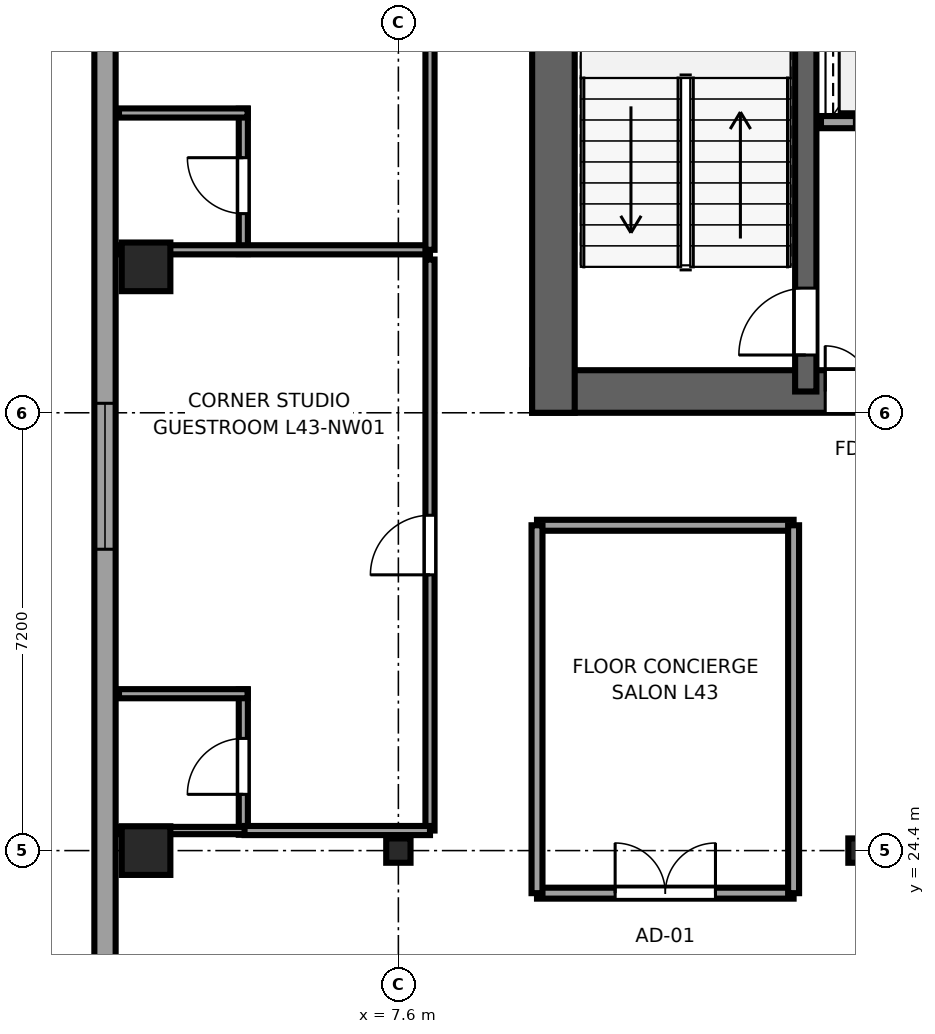
"""IFC4 building model, lengths in metres.
Left out: names, types, materials, properties, quantities, classifications, styles, units other than length and angle.
Written with IfcOpenShell. Run it as: python <this file> out.ifc"""

import sys

from ifc_helpers import new_model, si_unit, direction, frame, frame_2d, origin, origin_2d, place, context, subcontext, project, spatial, rectangle, i_section, extrude, source, transform, mapped, element, fill, save


model = new_model("IFC4")
c1 = context("Model", 3, precision=1e-05, world=origin(), true_north=direction((0.0, 1.0)))
c2 = subcontext(c1, "Body", "Model", "MODEL_VIEW")
j1 = project(units=[si_unit("LENGTHUNIT", "METRE"), si_unit("PLANEANGLEUNIT", "RADIAN")], contexts=[c1])
p1 = place(None, origin())
s1 = spatial("IfcSite", under=j1, at=p1, CompositionType="ELEMENT")
p2 = place(p1, origin())
s2 = spatial("IfcBuilding", under=s1, at=p2, CompositionType="ELEMENT")
p3 = place(p2, frame((0.0, 0.0, 164.8)))
s3 = spatial("IfcBuildingStorey", under=s2, at=p3, CompositionType="ELEMENT", Elevation=164.8)
p4 = place(p3, frame((9.8, 31.95, 0.0), z_axis=(0.0, 0.0, 1.0), x_axis=(1.0, 0.0, 0.0)))
e1 = element("IfcWall", 1, at=p4, inside=s3, PredefinedType="SHEAR", context=c2, shape_type="SweptSolid", body=[
    extrude(rectangle(XDim=26.4, YDim=0.7, at=frame_2d((13.2, 0.0))), origin(), (0.0, 0.0, 1.0), 3.55),
])
p5 = place(p4, frame((6.32, 0.0, 0.0), z_axis=(0.0, 0.0, 1.0), x_axis=(-1.0, 0.0, 0.0)))
e2 = element("IfcOpeningElement", 2, at=p5, cuts=e1, PredefinedType="OPENING", context=c2, shape_type="SweptSolid", body=[
    extrude(rectangle(XDim=1.5, YDim=2.04, at=frame_2d((0.75, 1.02))), frame((0.0, 0.36, 0.0), z_axis=(0.0, -1.0, 0.0), x_axis=(1.0, 0.0, 0.0)), (0.0, 0.0, 1.0), 0.72),
])
p6 = place(p4, frame((13.95, 0.0, 0.0), z_axis=(0.0, 0.0, 1.0), x_axis=(-1.0, 0.0, 0.0)))
e3 = element("IfcOpeningElement", 3, at=p6, cuts=e1, PredefinedType="OPENING", context=c2, shape_type="SweptSolid", body=[
    extrude(rectangle(XDim=1.5, YDim=2.04, at=frame_2d((0.75, 1.02))), frame((0.0, 0.36, 0.0), z_axis=(0.0, -1.0, 0.0), x_axis=(1.0, 0.0, 0.0)), (0.0, 0.0, 1.0), 0.72),
])
p7 = place(p4, frame((20.25, 0.0, 0.0), z_axis=(0.0, 0.0, 1.0), x_axis=(-1.0, 0.0, 0.0)))
e4 = element("IfcOpeningElement", 4, at=p7, cuts=e1, PredefinedType="OPENING", context=c2, shape_type="SweptSolid", body=[
    extrude(rectangle(XDim=1.5, YDim=2.04, at=frame_2d((0.75, 1.02))), frame((0.0, 0.36, 0.0), z_axis=(0.0, -1.0, 0.0), x_axis=(1.0, 0.0, 0.0)), (0.0, 0.0, 1.0), 0.72),
])
p8 = place(p4, frame((8.37, 0.0, 0.0), z_axis=(0.0, 0.0, 1.0), x_axis=(-1.0, 0.0, 0.0)))
e5 = element("IfcOpeningElement", 5, at=p8, cuts=e1, PredefinedType="OPENING", context=c2, shape_type="SweptSolid", body=[
    extrude(rectangle(XDim=0.82, YDim=2.01, at=frame_2d((0.41, 1.005))), frame((0.0, 0.36, 0.0), z_axis=(0.0, -1.0, 0.0), x_axis=(1.0, 0.0, 0.0)), (0.0, 0.0, 1.0), 0.72),
])
p9 = place(p3, frame((10.15, 31.6, 0.0), z_axis=(0.0, 0.0, 1.0), x_axis=(0.0, 1.0, 0.0)))
e6 = element("IfcWall", 6, at=p9, inside=s3, PredefinedType="SHEAR", context=c2, shape_type="SweptSolid", body=[
    extrude(rectangle(XDim=13.6, YDim=0.7, at=frame_2d((6.8, 0.0))), origin(), (0.0, 0.0, 1.0), 3.55),
])
p10 = place(p3, frame((14.3, 31.95, 0.0), z_axis=(0.0, 0.0, 1.0), x_axis=(0.0, 1.0, 0.0)))
e7 = element("IfcWall", 7, at=p10, inside=s3, PredefinedType="SHEAR", context=c2, shape_type="SweptSolid", body=[
    extrude(rectangle(XDim=12.9, YDim=0.35, at=frame_2d((6.45, 0.0))), origin(), (0.0, 0.0, 1.0), 3.55),
])
p11 = place(p10, frame((0.6, 0.0, 0.0)))
e8 = element("IfcOpeningElement", 8, at=p11, cuts=e7, PredefinedType="OPENING", context=c2, shape_type="SweptSolid", body=[
    extrude(rectangle(XDim=1.1, YDim=2.12, at=frame_2d((0.55, 1.06))), frame((0.0, 0.185, 0.0), z_axis=(0.0, -1.0, 0.0), x_axis=(1.0, 0.0, 0.0)), (0.0, 0.0, 1.0), 0.37),
])
m1 = source(origin(), c2, "Body", "SweptSolid", [
    extrude(rectangle(XDim=0.8, YDim=0.8, at=origin_2d()), origin(), (0.0, 0.0, 1.0), 3.55),
])
p12 = place(p3, frame((3.45, 24.4, 0.0), z_axis=(0.0, 0.0, 1.0), x_axis=(1.0, 0.0, 0.0)))
e9 = element("IfcColumn", 9, at=p12, inside=s3, PredefinedType="COLUMN", context=c2, shape_type="MappedRepresentation", body=[
    mapped(m1, transform((0.0, 0.0, 0.0), x_axis=(1.0, 0.0, 0.0), y_axis=(0.0, 1.0, 0.0), z_axis=(0.0, 0.0, 1.0), scale=1.0)),
])
m2 = source(origin(), c2, "Body", "SweptSolid", [
    extrude(i_section(OverallWidth=0.4, OverallDepth=0.4, WebThickness=0.02, FlangeThickness=0.035, at=origin_2d()), origin(), (0.0, 0.0, 1.0), 3.55),
])
for number, where, z_axis, x_axis in (
    (10, (7.6, 24.4, 0.0), (0.0, 0.0, 1.0), (1.0, 0.0, 0.0)),
    (11, (15.2, 24.4, 0.0), (0.0, 0.0, 1.0), (1.0, 0.0, 0.0)),
):
    element("IfcColumn", number, at=place(p3, frame(where, z_axis=z_axis, x_axis=x_axis)), inside=s3, PredefinedType="COLUMN", context=c2, shape_type="MappedRepresentation", body=[
        mapped(m2, transform((0.0, 0.0, 0.0), x_axis=(1.0, 0.0, 0.0), y_axis=(0.0, 1.0, 0.0), z_axis=(0.0, 0.0, 1.0), scale=1.0)),
    ])
p13 = place(p3, frame((3.45, 34.0, 0.0), z_axis=(0.0, 0.0, 1.0), x_axis=(1.0, 0.0, 0.0)))
e12 = element("IfcColumn", 12, at=p13, inside=s3, PredefinedType="COLUMN", context=c2, shape_type="MappedRepresentation", body=[
    mapped(m1, transform((0.0, 0.0, 0.0), x_axis=(1.0, 0.0, 0.0), y_axis=(0.0, 1.0, 0.0), z_axis=(0.0, 0.0, 1.0), scale=1.0)),
])
p14 = place(p3, frame((2.775, 41.583, 0.0), z_axis=(0.0, 0.0, 1.0), x_axis=(0.0, -1.0, 0.0)))
e13 = element("IfcWall", 13, at=p14, inside=s3, PredefinedType="SOLIDWALL", context=c2, shape_type="SweptSolid", body=[
    extrude(rectangle(XDim=34.566, YDim=0.35, at=frame_2d((17.283, 0.0))), origin(), (0.0, 0.0, 1.0), 3.37),
])
p15 = place(p14, frame((1.485, 0.0, 0.68)))
e14 = element("IfcOpeningElement", 14, at=p15, cuts=e13, PredefinedType="OPENING", context=c2, shape_type="SweptSolid", body=[
    extrude(rectangle(XDim=2.4, YDim=1.9, at=frame_2d((1.2, 0.95))), frame((0.0, 0.185, 0.0), z_axis=(0.0, -1.0, 0.0), x_axis=(1.0, 0.0, 0.0)), (0.0, 0.0, 1.0), 0.37),
])
p16 = place(p14, frame((9.827, 0.0, 0.68)))
e15 = element("IfcOpeningElement", 15, at=p16, cuts=e13, PredefinedType="OPENING", context=c2, shape_type="SweptSolid", body=[
    extrude(rectangle(XDim=2.4, YDim=1.9, at=frame_2d((1.2, 0.95))), frame((0.0, 0.185, 0.0), z_axis=(0.0, -1.0, 0.0), x_axis=(1.0, 0.0, 0.0)), (0.0, 0.0, 1.0), 0.37),
])
p17 = place(p14, frame((32.079, 0.0, 0.62)))
e16 = element("IfcOpeningElement", 16, at=p17, cuts=e13, PredefinedType="OPENING", context=c2, shape_type="SweptSolid", body=[
    extrude(rectangle(XDim=1.5, YDim=1.55, at=frame_2d((0.75, 0.775))), frame((0.0, 0.185, 0.0), z_axis=(0.0, -1.0, 0.0), x_axis=(1.0, 0.0, 0.0)), (0.0, 0.0, 1.0), 0.37),
])
p18 = place(p14, frame((28.583, 0.0, 0.62)))
e17 = element("IfcOpeningElement", 17, at=p18, cuts=e13, PredefinedType="OPENING", context=c2, shape_type="SweptSolid", body=[
    extrude(rectangle(XDim=1.5, YDim=1.55, at=frame_2d((0.75, 0.775))), frame((0.0, 0.185, 0.0), z_axis=(0.0, -1.0, 0.0), x_axis=(1.0, 0.0, 0.0)), (0.0, 0.0, 1.0), 0.37),
])
p19 = place(p14, frame((24.883, 0.0, 0.62)))
e18 = element("IfcOpeningElement", 18, at=p19, cuts=e13, PredefinedType="OPENING", context=c2, shape_type="SweptSolid", body=[
    extrude(rectangle(XDim=1.5, YDim=1.55, at=frame_2d((0.75, 0.775))), frame((0.0, 0.185, 0.0), z_axis=(0.0, -1.0, 0.0), x_axis=(1.0, 0.0, 0.0)), (0.0, 0.0, 1.0), 0.37),
])
p20 = place(p14, frame((21.183, 0.0, 0.62)))
e19 = element("IfcOpeningElement", 19, at=p20, cuts=e13, PredefinedType="OPENING", context=c2, shape_type="SweptSolid", body=[
    extrude(rectangle(XDim=1.5, YDim=1.55, at=frame_2d((0.75, 0.775))), frame((0.0, 0.185, 0.0), z_axis=(0.0, -1.0, 0.0), x_axis=(1.0, 0.0, 0.0)), (0.0, 0.0, 1.0), 0.37),
])
p21 = place(p3, frame((14.55, 36.38, 0.0), z_axis=(0.0, 0.0, 1.0), x_axis=(1.0, 0.0, 0.0)))
e20 = element("IfcWall", 20, at=p21, inside=s3, PredefinedType="SOLIDWALL", context=c2, shape_type="SweptSolid", body=[
    extrude(rectangle(XDim=4.075, YDim=0.2, at=frame_2d((2.038, 0.0))), origin(), (0.0, 0.0, 1.0), 3.37),
])
p22 = place(p21, frame((0.55, 0.0, 0.0)))
e21 = element("IfcOpeningElement", 21, at=p22, cuts=e20, PredefinedType="OPENING", context=c2, shape_type="SweptSolid", body=[
    extrude(rectangle(XDim=1.1, YDim=2.12, at=frame_2d((0.55, 1.06))), frame((0.0, 0.11, 0.0), z_axis=(0.0, -1.0, 0.0), x_axis=(1.0, 0.0, 0.0)), (0.0, 0.0, 1.0), 0.22),
])
p23 = place(p21, frame((2.45, 0.0, 0.0)))
e22 = element("IfcOpeningElement", 22, at=p23, cuts=e20, PredefinedType="OPENING", context=c2, shape_type="SweptSolid", body=[
    extrude(rectangle(XDim=1.1, YDim=2.12, at=frame_2d((0.55, 1.06))), frame((0.0, 0.11, 0.0), z_axis=(0.0, -1.0, 0.0), x_axis=(1.0, 0.0, 0.0)), (0.0, 0.0, 1.0), 0.22),
])
p24 = place(p3, frame((5.05, 24.66, 0.0), z_axis=(0.0, 0.0, 1.0), x_axis=(0.0, 1.0, 0.0)))
e23 = element("IfcWall", 23, at=p24, inside=s3, PredefinedType="PARTITIONING", context=c2, shape_type="SweptSolid", body=[
    extrude(rectangle(XDim=2.39, YDim=0.15, at=frame_2d((1.195, 0.0))), origin(), (0.0, 0.0, 1.0), 3.37),
])
p25 = place(p24, frame((0.665, 0.0, 0.0)))
e24 = element("IfcOpeningElement", 24, at=p25, cuts=e23, PredefinedType="OPENING", context=c2, shape_type="SweptSolid", body=[
    extrude(rectangle(XDim=0.92, YDim=2.01, at=frame_2d((0.46, 1.005))), frame((0.0, 0.085, 0.0), z_axis=(0.0, -1.0, 0.0), x_axis=(1.0, 0.0, 0.0)), (0.0, 0.0, 1.0), 0.17),
])
p26 = place(p3, frame((3.005, 24.73, 0.0), z_axis=(0.0, 0.0, 1.0), x_axis=(1.0, 0.0, 0.0)))
e25 = element("IfcWall", 25, at=p26, inside=s3, PredefinedType="PLUMBINGWALL", context=c2, shape_type="SweptSolid", body=[
    extrude(rectangle(XDim=2.115, YDim=0.12, at=frame_2d((1.058, 0.0))), origin(), (0.0, 0.0, 1.0), 3.37),
])
p27 = place(p3, frame((3.005, 26.98, 0.0), z_axis=(0.0, 0.0, 1.0), x_axis=(1.0, 0.0, 0.0)))
e26 = element("IfcWall", 26, at=p27, inside=s3, PredefinedType="PARTITIONING", context=c2, shape_type="SweptSolid", body=[
    extrude(rectangle(XDim=2.115, YDim=0.15, at=frame_2d((1.058, 0.0))), origin(), (0.0, 0.0, 1.0), 3.37),
])
p28 = place(p3, frame((5.05, 34.21, 0.0), z_axis=(0.0, 0.0, 1.0), x_axis=(0.0, 1.0, 0.0)))
e27 = element("IfcWall", 27, at=p28, inside=s3, PredefinedType="PARTITIONING", context=c2, shape_type="SweptSolid", body=[
    extrude(rectangle(XDim=2.39, YDim=0.15, at=frame_2d((1.195, 0.0))), origin(), (0.0, 0.0, 1.0), 3.37),
])
p29 = place(p28, frame((0.665, 0.0, 0.0)))
e28 = element("IfcOpeningElement", 28, at=p29, cuts=e27, PredefinedType="OPENING", context=c2, shape_type="SweptSolid", body=[
    extrude(rectangle(XDim=0.92, YDim=2.01, at=frame_2d((0.46, 1.005))), frame((0.0, 0.085, 0.0), z_axis=(0.0, -1.0, 0.0), x_axis=(1.0, 0.0, 0.0)), (0.0, 0.0, 1.0), 0.17),
])
p30 = place(p3, frame((3.005, 34.28, 0.0), z_axis=(0.0, 0.0, 1.0), x_axis=(1.0, 0.0, 0.0)))
e29 = element("IfcWall", 29, at=p30, inside=s3, PredefinedType="PARTITIONING", context=c2, shape_type="SweptSolid", body=[
    extrude(rectangle(XDim=5.115, YDim=0.15, at=frame_2d((2.558, 0.0))), origin(), (0.0, 0.0, 1.0), 2.16),
])
p31 = place(p3, frame((3.005, 36.53, 0.0), z_axis=(0.0, 0.0, 1.0), x_axis=(1.0, 0.0, 0.0)))
e30 = element("IfcWall", 30, at=p31, inside=s3, PredefinedType="PARTITIONING", context=c2, shape_type="SweptSolid", body=[
    extrude(rectangle(XDim=2.115, YDim=0.15, at=frame_2d((1.058, 0.0))), origin(), (0.0, 0.0, 1.0), 3.37),
])
p32 = place(p3, frame((8.12, 24.73, 0.0), z_axis=(0.0, 0.0, 1.0), x_axis=(0.0, 1.0, 0.0)))
e31 = element("IfcWall", 31, at=p32, inside=s3, PredefinedType="PARTITIONING", context=c2, shape_type="SweptSolid", body=[
    extrude(rectangle(XDim=9.39, YDim=0.15, at=frame_2d((4.695, 0.0))), origin(), (0.0, 0.0, 1.0), 3.37),
])
p33 = place(p32, frame((4.205, 0.0, 0.0)))
e32 = element("IfcOpeningElement", 32, at=p33, cuts=e31, PredefinedType="OPENING", context=c2, shape_type="SweptSolid", body=[
    extrude(rectangle(XDim=0.98, YDim=2.12, at=frame_2d((0.49, 1.06))), frame((0.0, 0.085, 0.0), z_axis=(0.0, -1.0, 0.0), x_axis=(1.0, 0.0, 0.0)), (0.0, 0.0, 1.0), 0.17),
])
p34 = place(p3, frame((5.07, 24.73, 0.0), z_axis=(0.0, 0.0, 1.0), x_axis=(1.0, 0.0, 0.0)))
e33 = element("IfcWall", 33, at=p34, inside=s3, PredefinedType="PARTITIONING", context=c2, shape_type="SweptSolid", body=[
    extrude(rectangle(XDim=3.05, YDim=0.15, at=frame_2d((1.525, 0.0))), origin(), (0.0, 0.0, 1.0), 3.37),
])
p35 = place(p3, frame((8.12, 34.28, 0.0), z_axis=(0.0, 0.0, 1.0), x_axis=(0.0, 1.0, 0.0)))
e34 = element("IfcWall", 34, at=p35, inside=s3, PredefinedType="PARTITIONING", context=c2, shape_type="SweptSolid", body=[
    extrude(rectangle(XDim=11.315, YDim=0.15, at=frame_2d((5.657, 0.0))), origin(), (0.0, 0.0, 1.0), 3.37),
])
p36 = place(p35, frame((4.42, 0.0, 0.0)))
e35 = element("IfcOpeningElement", 35, at=p36, cuts=e34, PredefinedType="OPENING", context=c2, shape_type="SweptSolid", body=[
    extrude(rectangle(XDim=0.98, YDim=2.12, at=frame_2d((0.49, 1.06))), frame((0.0, 0.085, 0.0), z_axis=(0.0, -1.0, 0.0), x_axis=(1.0, 0.0, 0.0)), (0.0, 0.0, 1.0), 0.17),
])
p37 = place(p3, frame((9.88, 23.7, 0.0), z_axis=(0.0, 0.0, 1.0), x_axis=(1.0, 0.0, 0.0)))
e36 = element("IfcWall", 36, at=p37, inside=s3, PredefinedType="PARTITIONING", context=c2, shape_type="SweptSolid", body=[
    extrude(rectangle(XDim=4.22, YDim=0.18, at=frame_2d((2.11, 0.0))), origin(), (0.0, 0.0, 1.0), 3.37),
])
p38 = place(p37, frame((1.285, 0.0, 0.0)))
e37 = element("IfcOpeningElement", 37, at=p38, cuts=e36, PredefinedType="OPENING", context=c2, shape_type="SweptSolid", body=[
    extrude(rectangle(XDim=1.65, YDim=2.15, at=frame_2d((0.825, 1.075))), frame((0.0, 0.1, 0.0), z_axis=(0.0, -1.0, 0.0), x_axis=(1.0, 0.0, 0.0)), (0.0, 0.0, 1.0), 0.2),
])
p39 = place(p3, frame((9.88, 29.75, 0.0), z_axis=(0.0, 0.0, 1.0), x_axis=(1.0, 0.0, 0.0)))
e38 = element("IfcWall", 38, at=p39, inside=s3, PredefinedType="PARTITIONING", context=c2, shape_type="SweptSolid", body=[
    extrude(rectangle(XDim=4.22, YDim=0.18, at=frame_2d((2.11, 0.0))), origin(), (0.0, 0.0, 1.0), 3.37),
])
for number, where, z_axis, x_axis in (
    (39, (9.88, 23.7, 0.0), (0.0, 0.0, 1.0), (0.0, 1.0, 0.0)),
    (40, (14.1, 23.7, 0.0), (0.0, 0.0, 1.0), (0.0, 1.0, 0.0)),
):
    element("IfcWall", number, at=place(p3, frame(where, z_axis=z_axis, x_axis=x_axis)), inside=s3, PredefinedType="PARTITIONING", context=c2, shape_type="SweptSolid", body=[
        extrude(rectangle(XDim=6.05, YDim=0.18, at=frame_2d((3.025, 0.0))), origin(), (0.0, 0.0, 1.0), 3.37),
    ])
m3 = source(origin(), c2, "Body", "SweptSolid", [
    extrude(rectangle(XDim=2.4, YDim=1.9, at=frame_2d((1.2, 0.95))), frame((0.0, 0.09, 0.0), z_axis=(0.0, -1.0, 0.0), x_axis=(1.0, 0.0, 0.0)), (0.0, 0.0, 1.0), 0.06),
])
p40 = place(p16, origin())
e41 = element("IfcWindow", 41, at=p40, inside=s3, PartitioningType="TRIPLE_PANEL_HORIZONTAL", PredefinedType="WINDOW", context=c2, shape_type="MappedRepresentation", body=[
    mapped(m3, transform((0.0, 0.0, 0.0), x_axis=(1.0, 0.0, 0.0), y_axis=(0.0, 1.0, 0.0), z_axis=(0.0, 0.0, 1.0), scale=1.0)),
])
fill(e15, e41)
m4 = source(origin(), c2, "Body", "SweptSolid", [
    extrude(rectangle(XDim=1.1, YDim=2.12, at=frame_2d((0.55, 1.06))), frame((0.0, 0.025, 0.0), z_axis=(0.0, -1.0, 0.0), x_axis=(1.0, 0.0, 0.0)), (0.0, 0.0, 1.0), 0.05),
])
p41 = place(p11, origin())
e42 = element("IfcDoor", 42, at=p41, inside=s3, OperationType="SINGLE_SWING_LEFT", PredefinedType="DOOR", context=c2, shape_type="MappedRepresentation", body=[
    mapped(m4, transform((0.0, 0.0, 0.0), x_axis=(1.0, 0.0, 0.0), y_axis=(0.0, 1.0, 0.0), z_axis=(0.0, 0.0, 1.0), scale=1.0)),
])
fill(e8, e42)
m5 = source(origin(), c2, "Body", "SweptSolid", [
    extrude(rectangle(XDim=1.5, YDim=2.04, at=frame_2d((0.75, 1.02))), frame((0.0, 0.025, 0.0), z_axis=(0.0, -1.0, 0.0), x_axis=(1.0, 0.0, 0.0)), (0.0, 0.0, 1.0), 0.05),
])
p42 = place(p5, origin())
e43 = element("IfcDoor", 43, at=p42, inside=s3, OperationType="DOUBLE_DOOR_SINGLE_SWING", PredefinedType="DOOR", context=c2, shape_type="MappedRepresentation", body=[
    mapped(m5, transform((0.0, 0.0, 0.0), x_axis=(1.0, 0.0, 0.0), y_axis=(0.0, 1.0, 0.0), z_axis=(0.0, 0.0, 1.0), scale=1.0)),
])
fill(e2, e43)
m6 = source(origin(), c2, "Body", "SweptSolid", [
    extrude(rectangle(XDim=0.92, YDim=2.01, at=frame_2d((0.46, 1.005))), frame((0.0, 0.025, 0.0), z_axis=(0.0, -1.0, 0.0), x_axis=(1.0, 0.0, 0.0)), (0.0, 0.0, 1.0), 0.05),
])
p43 = place(p25, origin())
e44 = element("IfcDoor", 44, at=p43, inside=s3, OperationType="SINGLE_SWING_LEFT", PredefinedType="DOOR", context=c2, shape_type="MappedRepresentation", body=[
    mapped(m6, transform((0.0, 0.0, 0.0), x_axis=(1.0, 0.0, 0.0), y_axis=(0.0, 1.0, 0.0), z_axis=(0.0, 0.0, 1.0), scale=1.0)),
])
fill(e24, e44)
p44 = place(p29, origin())
e45 = element("IfcDoor", 45, at=p44, inside=s3, OperationType="SINGLE_SWING_RIGHT", PredefinedType="DOOR", context=c2, shape_type="MappedRepresentation", body=[
    mapped(m6, transform((0.0, 0.0, 0.0), x_axis=(1.0, 0.0, 0.0), y_axis=(0.0, 1.0, 0.0), z_axis=(0.0, 0.0, 1.0), scale=1.0)),
])
fill(e28, e45)
m7 = source(origin(), c2, "Body", "SweptSolid", [
    extrude(rectangle(XDim=0.98, YDim=2.12, at=frame_2d((0.49, 1.06))), frame((0.0, 0.025, 0.0), z_axis=(0.0, -1.0, 0.0), x_axis=(1.0, 0.0, 0.0)), (0.0, 0.0, 1.0), 0.05),
])
p45 = place(p33, origin())
e46 = element("IfcDoor", 46, at=p45, inside=s3, OperationType="SINGLE_SWING_LEFT", PredefinedType="DOOR", context=c2, shape_type="MappedRepresentation", body=[
    mapped(m7, transform((0.0, 0.0, 0.0), x_axis=(1.0, 0.0, 0.0), y_axis=(0.0, 1.0, 0.0), z_axis=(0.0, 0.0, 1.0), scale=1.0)),
])
fill(e32, e46)
m8 = source(origin(), c2, "Body", "SweptSolid", [
    extrude(rectangle(XDim=1.65, YDim=2.15, at=frame_2d((0.825, 1.075))), frame((0.0, 0.025, 0.0), z_axis=(0.0, -1.0, 0.0), x_axis=(1.0, 0.0, 0.0)), (0.0, 0.0, 1.0), 0.05),
])
p46 = place(p38, origin())
e47 = element("IfcDoor", 47, at=p46, inside=s3, OperationType="DOUBLE_DOOR_SINGLE_SWING", PredefinedType="DOOR", context=c2, shape_type="MappedRepresentation", body=[
    mapped(m8, transform((0.0, 0.0, 0.0), x_axis=(1.0, 0.0, 0.0), y_axis=(0.0, 1.0, 0.0), z_axis=(0.0, 0.0, 1.0), scale=1.0)),
])
fill(e37, e47)
save(model, sys.argv[1])
